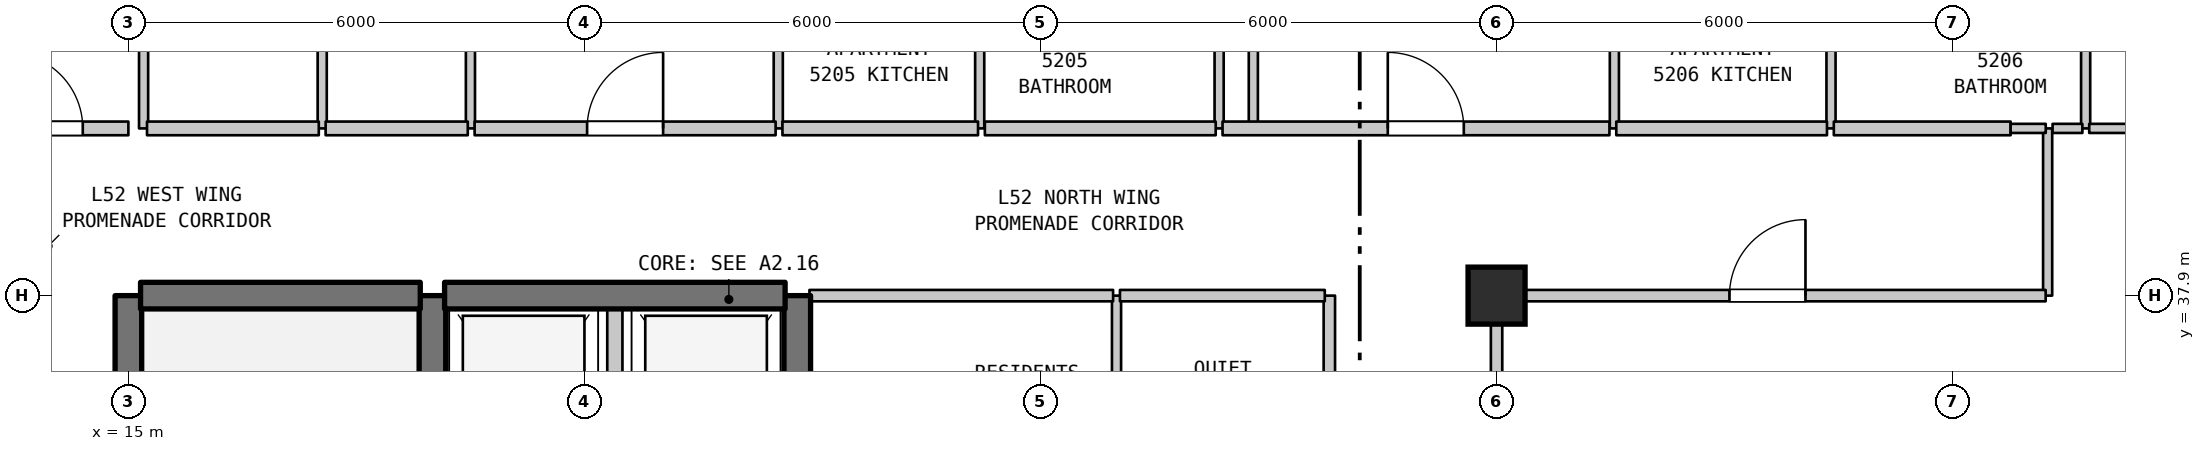
"""IFC4 building model, lengths in metres.
Left out: names, types, materials, properties, quantities, classifications, styles, units other than length and angle.
Written with IfcOpenShell. Run it as: python <this file> out.ifc"""

import sys

from ifc_helpers import new_model, si_unit, direction, frame, frame_2d, origin, origin_2d, place, context, subcontext, project, spatial, rectangle, extrude, element, fill, save


model = new_model("IFC4")
c1 = context("Model", 3, precision=1e-05, world=origin(), true_north=direction((0.0, 1.0)))
c2 = subcontext(c1, "Body", "Model", "MODEL_VIEW")
j1 = project(units=[si_unit("LENGTHUNIT", "METRE"), si_unit("PLANEANGLEUNIT", "RADIAN")], contexts=[c1])
p1 = place(None, origin())
s1 = spatial("IfcSite", under=j1, at=p1, CompositionType="ELEMENT")
p2 = place(p1, origin())
s2 = spatial("IfcBuilding", under=s1, at=p2, CompositionType="ELEMENT")
p3 = place(p2, frame((0.0, 0.0, 210.6)))
s3 = spatial("IfcBuildingStorey", under=s2, at=p3, CompositionType="ELEMENT", Elevation=210.6)
p4 = place(p3, frame((33.0, 37.9, 0.0), z_axis=(0.0, 0.0, 1.0), x_axis=(1.0, 0.0, 0.0)))
e1 = element("IfcColumn", 1, at=p4, inside=s3, PredefinedType="COLUMN", context=c2, shape_type="SweptSolid", body=[
    extrude(rectangle(XDim=0.75, YDim=0.75, at=origin_2d()), origin(), (0.0, 0.0, 1.0), 3.7),
])
p5 = place(p3, frame((15.0, 31.1, 0.0), z_axis=(0.0, 0.0, 1.0), x_axis=(0.0, 1.0, 0.0)))
e2 = element("IfcWall", 2, at=p5, inside=s3, PredefinedType="SHEAR", context=c2, shape_type="SweptSolid", body=[
    extrude(rectangle(XDim=6.8, YDim=0.35, at=frame_2d((3.4, 0.0))), origin(), (0.0, 0.0, 1.0), 3.39),
])
p6 = place(p3, frame((15.2, 40.1, 0.0), z_axis=(0.0, 0.0, 1.0), x_axis=(0.0, 1.0, 0.0)))
e3 = element("IfcWall", 3, at=p6, inside=s3, PredefinedType="PARTITIONING", context=c2, shape_type="SweptSolid", body=[
    extrude(rectangle(XDim=3.2, YDim=0.12, at=frame_2d((1.6, 0.0))), origin(), (0.0, 0.0, 1.0), 3.39),
])
p7 = place(p3, frame((17.55, 40.1, 0.0), z_axis=(0.0, 0.0, 1.0), x_axis=(0.0, 1.0, 0.0)))
e4 = element("IfcWall", 4, at=p7, inside=s3, PredefinedType="PARTITIONING", context=c2, shape_type="SweptSolid", body=[
    extrude(rectangle(XDim=3.2, YDim=0.12, at=frame_2d((1.6, 0.0))), origin(), (0.0, 0.0, 1.0), 3.39),
])
p8 = place(p7, frame((1.15, 0.0, 0.0)))
e5 = element("IfcOpeningElement", 5, at=p8, cuts=e4, PredefinedType="OPENING", context=c2, shape_type="SweptSolid", body=[
    extrude(rectangle(XDim=0.9, YDim=2.15, at=frame_2d((0.45, 1.075))), frame((0.0, 0.07, 0.0), z_axis=(0.0, -1.0, 0.0), x_axis=(1.0, 0.0, 0.0)), (0.0, 0.0, 1.0), 0.14),
])
p9 = place(p3, frame((19.0, 35.0, 0.0), z_axis=(0.0, 0.0, 1.0), x_axis=(0.0, 1.0, 0.0)))
e6 = element("IfcWall", 6, at=p9, inside=s3, PredefinedType="SHEAR", context=c2, shape_type="SweptSolid", body=[
    extrude(rectangle(XDim=2.9, YDim=0.35, at=frame_2d((1.45, 0.0))), origin(), (0.0, 0.0, 1.0), 3.39),
])
p10 = place(p3, frame((19.5, 40.1, 0.0), z_axis=(0.0, 0.0, 1.0), x_axis=(0.0, 1.0, 0.0)))
e7 = element("IfcWall", 7, at=p10, inside=s3, PredefinedType="PARTITIONING", context=c2, shape_type="SweptSolid", body=[
    extrude(rectangle(XDim=13.79, YDim=0.12, at=frame_2d((6.895, 0.0))), origin(), (0.0, 0.0, 1.0), 3.39),
])
p11 = place(p3, frame((21.4, 35.0, 0.0), z_axis=(0.0, 0.0, 1.0), x_axis=(0.0, 1.0, 0.0)))
e8 = element("IfcWall", 8, at=p11, inside=s3, PredefinedType="STANDARD", context=c2, shape_type="SweptSolid", body=[
    extrude(rectangle(XDim=2.9, YDim=0.2, at=frame_2d((1.45, 0.0))), origin(), (0.0, 0.0, 1.0), 3.39),
])
p12 = place(p3, frame((23.55, 40.1, 0.0), z_axis=(0.0, 0.0, 1.0), x_axis=(0.0, 1.0, 0.0)))
e9 = element("IfcWall", 9, at=p12, inside=s3, PredefinedType="PARTITIONING", context=c2, shape_type="SweptSolid", body=[
    extrude(rectangle(XDim=2.3, YDim=0.12, at=frame_2d((1.15, 0.0))), origin(), (0.0, 0.0, 1.0), 3.39),
])
p13 = place(p3, frame((23.8, 35.0, 0.0), z_axis=(0.0, 0.0, 1.0), x_axis=(0.0, 1.0, 0.0)))
e10 = element("IfcWall", 10, at=p13, inside=s3, PredefinedType="SHEAR", context=c2, shape_type="SweptSolid", body=[
    extrude(rectangle(XDim=2.9, YDim=0.35, at=frame_2d((1.45, 0.0))), origin(), (0.0, 0.0, 1.0), 3.39),
])
p14 = place(p3, frame((26.2, 40.1, 0.0), z_axis=(0.0, 0.0, 1.0), x_axis=(0.0, 1.0, 0.0)))
e11 = element("IfcWall", 11, at=p14, inside=s3, PredefinedType="PARTITIONING", context=c2, shape_type="SweptSolid", body=[
    extrude(rectangle(XDim=2.3, YDim=0.12, at=frame_2d((1.15, 0.0))), origin(), (0.0, 0.0, 1.0), 3.39),
])
p15 = place(p3, frame((28.0, 35.0, 0.0), z_axis=(0.0, 0.0, 1.0), x_axis=(0.0, 1.0, 0.0)))
e12 = element("IfcWall", 12, at=p15, inside=s3, PredefinedType="PARTITIONING", context=c2, shape_type="SweptSolid", body=[
    extrude(rectangle(XDim=2.9, YDim=0.12, at=frame_2d((1.45, 0.0))), origin(), (0.0, 0.0, 1.0), 3.39),
])
p16 = place(p3, frame((29.35, 40.1, 0.0), z_axis=(0.0, 0.0, 1.0), x_axis=(0.0, 1.0, 0.0)))
e13 = element("IfcWall", 13, at=p16, inside=s3, PredefinedType="PARTITIONING", context=c2, shape_type="SweptSolid", body=[
    extrude(rectangle(XDim=2.3, YDim=0.12, at=frame_2d((1.15, 0.0))), origin(), (0.0, 0.0, 1.0), 3.39),
])
p17 = place(p3, frame((29.8, 40.1, 0.0), z_axis=(0.0, 0.0, 1.0), x_axis=(0.0, 1.0, 0.0)))
e14 = element("IfcWall", 14, at=p17, inside=s3, PredefinedType="PARTITIONING", context=c2, shape_type="SweptSolid", body=[
    extrude(rectangle(XDim=13.79, YDim=0.12, at=frame_2d((6.895, 0.0))), origin(), (0.0, 0.0, 1.0), 3.39),
])
p18 = place(p3, frame((30.8, 35.0, 0.0), z_axis=(0.0, 0.0, 1.0), x_axis=(0.0, 1.0, 0.0)))
e15 = element("IfcWall", 15, at=p18, inside=s3, PredefinedType="STANDARD", context=c2, shape_type="SweptSolid", body=[
    extrude(rectangle(XDim=2.9, YDim=0.15, at=frame_2d((1.45, 0.0))), origin(), (0.0, 0.0, 1.0), 3.39),
])
p19 = place(p3, frame((33.0, 29.16, 0.0), z_axis=(0.0, 0.0, 1.0), x_axis=(0.0, 1.0, 0.0)))
e16 = element("IfcWall", 16, at=p19, inside=s3, PredefinedType="STANDARD", context=c2, shape_type="SweptSolid", body=[
    extrude(rectangle(XDim=8.74, YDim=0.15, at=frame_2d((4.37, 0.0))), origin(), (0.0, 0.0, 1.0), 2.89),
])
p20 = place(p19, frame((3.799, 0.0, 0.0)))
e17 = element("IfcOpeningElement", 17, at=p20, cuts=e16, PredefinedType="OPENING", context=c2, shape_type="SweptSolid", body=[
    extrude(rectangle(XDim=1.0, YDim=2.15, at=frame_2d((0.5, 1.075))), frame((0.0, 0.085, 0.0), z_axis=(0.0, -1.0, 0.0), x_axis=(1.0, 0.0, 0.0)), (0.0, 0.0, 1.0), 0.17),
])
for number, where, z_axis, x_axis in (
    (18, (34.55, 40.1, 0.0), (0.0, 0.0, 1.0), (0.0, 1.0, 0.0)),
    (19, (37.4, 40.1, 0.0), (0.0, 0.0, 1.0), (0.0, 1.0, 0.0)),
):
    element("IfcWall", number, at=place(p3, frame(where, z_axis=z_axis, x_axis=x_axis)), inside=s3, PredefinedType="PARTITIONING", context=c2, shape_type="SweptSolid", body=[
        extrude(rectangle(XDim=2.3, YDim=0.12, at=frame_2d((1.15, 0.0))), origin(), (0.0, 0.0, 1.0), 3.39),
    ])
p21 = place(p3, frame((40.25, 37.9, 0.0), z_axis=(0.0, 0.0, 1.0), x_axis=(0.0, 1.0, 0.0)))
e20 = element("IfcWall", 20, at=p21, inside=s3, PredefinedType="PARTITIONING", context=c2, shape_type="SweptSolid", body=[
    extrude(rectangle(XDim=2.2, YDim=0.12, at=frame_2d((1.1, 0.0))), origin(), (0.0, 0.0, 1.0), 3.39),
])
p22 = place(p3, frame((40.75, 40.1, 0.0), z_axis=(0.0, 0.0, 1.0), x_axis=(0.0, 1.0, 0.0)))
e21 = element("IfcWall", 21, at=p22, inside=s3, PredefinedType="PARTITIONING", context=c2, shape_type="SweptSolid", body=[
    extrude(rectangle(XDim=2.3, YDim=0.12, at=frame_2d((1.15, 0.0))), origin(), (0.0, 0.0, 1.0), 3.39),
])
p23 = place(p3, frame((15.16, 37.9, 0.0), z_axis=(0.0, 0.0, 1.0), x_axis=(1.0, 0.0, 0.0)))
e22 = element("IfcWall", 22, at=p23, inside=s3, PredefinedType="SHEAR", context=c2, shape_type="SweptSolid", body=[
    extrude(rectangle(XDim=3.68, YDim=0.35, at=frame_2d((1.84, 0.0))), origin(), (0.0, 0.0, 1.0), 3.39),
])
p24 = place(p3, frame((19.16, 37.9, 0.0), z_axis=(0.0, 0.0, 1.0), x_axis=(1.0, 0.0, 0.0)))
e23 = element("IfcWall", 23, at=p24, inside=s3, PredefinedType="SHEAR", context=c2, shape_type="SweptSolid", body=[
    extrude(rectangle(XDim=4.48, YDim=0.35, at=frame_2d((2.24, 0.0))), origin(), (0.0, 0.0, 1.0), 3.39),
])
p25 = place(p3, frame((23.96, 37.9, 0.0), z_axis=(0.0, 0.0, 1.0), x_axis=(1.0, 0.0, 0.0)))
e24 = element("IfcWall", 24, at=p25, inside=s3, PredefinedType="STANDARD", context=c2, shape_type="SweptSolid", body=[
    extrude(rectangle(XDim=3.995, YDim=0.15, at=frame_2d((1.998, 0.0))), origin(), (0.0, 0.0, 1.0), 2.89),
])
p26 = place(p3, frame((28.045, 37.9, 0.0), z_axis=(0.0, 0.0, 1.0), x_axis=(1.0, 0.0, 0.0)))
e25 = element("IfcWall", 25, at=p26, inside=s3, PredefinedType="STANDARD", context=c2, shape_type="SweptSolid", body=[
    extrude(rectangle(XDim=2.695, YDim=0.15, at=frame_2d((1.348, 0.0))), origin(), (0.0, 0.0, 1.0), 2.89),
])
p27 = place(p3, frame((33.06, 37.9, 0.0), z_axis=(0.0, 0.0, 1.0), x_axis=(1.0, 0.0, 0.0)))
e26 = element("IfcWall", 26, at=p27, inside=s3, PredefinedType="STANDARD", context=c2, shape_type="SweptSolid", body=[
    extrude(rectangle(XDim=7.164, YDim=0.15, at=frame_2d((3.582, 0.0))), origin(), (0.0, 0.0, 1.0), 3.39),
])
p28 = place(p27, frame((3.004, 0.0, 0.0)))
e27 = element("IfcOpeningElement", 27, at=p28, cuts=e26, PredefinedType="OPENING", context=c2, shape_type="SweptSolid", body=[
    extrude(rectangle(XDim=1.0, YDim=2.15, at=frame_2d((0.5, 1.075))), frame((0.0, 0.085, 0.0), z_axis=(0.0, -1.0, 0.0), x_axis=(1.0, 0.0, 0.0)), (0.0, 0.0, 1.0), 0.17),
])
p29 = place(p3, frame((12.875, 40.1, 0.0), z_axis=(0.0, 0.0, 1.0), x_axis=(1.0, 0.0, 0.0)))
e28 = element("IfcWall", 28, at=p29, inside=s3, PredefinedType="STANDARD", context=c2, shape_type="SweptSolid", body=[
    extrude(rectangle(XDim=2.125, YDim=0.18, at=frame_2d((1.062, 0.0))), origin(), (0.0, 0.0, 1.0), 3.39),
])
p30 = place(p29, frame((0.525, 0.0, 0.0)))
e29 = element("IfcOpeningElement", 29, at=p30, cuts=e28, PredefinedType="OPENING", context=c2, shape_type="SweptSolid", body=[
    extrude(rectangle(XDim=1.0, YDim=2.15, at=frame_2d((0.5, 1.075))), frame((0.0, 0.1, 0.0), z_axis=(0.0, -1.0, 0.0), x_axis=(1.0, 0.0, 0.0)), (0.0, 0.0, 1.0), 0.2),
])
p31 = place(p3, frame((15.245, 40.1, 0.0), z_axis=(0.0, 0.0, 1.0), x_axis=(1.0, 0.0, 0.0)))
e30 = element("IfcWall", 30, at=p31, inside=s3, PredefinedType="STANDARD", context=c2, shape_type="SweptSolid", body=[
    extrude(rectangle(XDim=2.26, YDim=0.18, at=frame_2d((1.13, 0.0))), origin(), (0.0, 0.0, 1.0), 3.39),
])
p32 = place(p3, frame((17.595, 40.1, 0.0), z_axis=(0.0, 0.0, 1.0), x_axis=(1.0, 0.0, 0.0)))
e31 = element("IfcWall", 31, at=p32, inside=s3, PredefinedType="STANDARD", context=c2, shape_type="SweptSolid", body=[
    extrude(rectangle(XDim=1.87, YDim=0.18, at=frame_2d((0.935, 0.0))), origin(), (0.0, 0.0, 1.0), 3.39),
])
p33 = place(p3, frame((19.555, 40.1, 0.0), z_axis=(0.0, 0.0, 1.0), x_axis=(1.0, 0.0, 0.0)))
e32 = element("IfcWall", 32, at=p33, inside=s3, PredefinedType="STANDARD", context=c2, shape_type="SweptSolid", body=[
    extrude(rectangle(XDim=3.96, YDim=0.18, at=frame_2d((1.98, 0.0))), origin(), (0.0, 0.0, 1.0), 3.39),
])
p34 = place(p33, frame((1.48, 0.0, 0.0)))
e33 = element("IfcOpeningElement", 33, at=p34, cuts=e32, PredefinedType="OPENING", context=c2, shape_type="SweptSolid", body=[
    extrude(rectangle(XDim=1.0, YDim=2.15, at=frame_2d((0.5, 1.075))), frame((0.0, 0.1, 0.0), z_axis=(0.0, -1.0, 0.0), x_axis=(1.0, 0.0, 0.0)), (0.0, 0.0, 1.0), 0.2),
])
p35 = place(p3, frame((23.605, 40.1, 0.0), z_axis=(0.0, 0.0, 1.0), x_axis=(1.0, 0.0, 0.0)))
e34 = element("IfcWall", 34, at=p35, inside=s3, PredefinedType="STANDARD", context=c2, shape_type="SweptSolid", body=[
    extrude(rectangle(XDim=2.573, YDim=0.18, at=frame_2d((1.287, 0.0))), origin(), (0.0, 0.0, 1.0), 3.39),
])
p36 = place(p3, frame((26.268, 40.1, 0.0), z_axis=(0.0, 0.0, 1.0), x_axis=(1.0, 0.0, 0.0)))
e35 = element("IfcWall", 35, at=p36, inside=s3, PredefinedType="STANDARD", context=c2, shape_type="SweptSolid", body=[
    extrude(rectangle(XDim=3.037, YDim=0.18, at=frame_2d((1.519, 0.0))), origin(), (0.0, 0.0, 1.0), 3.39),
])
p37 = place(p3, frame((29.395, 40.1, 0.0), z_axis=(0.0, 0.0, 1.0), x_axis=(1.0, 0.0, 0.0)))
e36 = element("IfcWall", 36, at=p37, inside=s3, PredefinedType="STANDARD", context=c2, shape_type="SweptSolid", body=[
    extrude(rectangle(XDim=5.09, YDim=0.18, at=frame_2d((2.545, 0.0))), origin(), (0.0, 0.0, 1.0), 3.39),
])
p38 = place(p37, frame((2.174, 0.0, 0.0)))
e37 = element("IfcOpeningElement", 37, at=p38, cuts=e36, PredefinedType="OPENING", context=c2, shape_type="SweptSolid", body=[
    extrude(rectangle(XDim=1.0, YDim=2.15, at=frame_2d((0.5, 1.075))), frame((0.0, 0.1, 0.0), z_axis=(0.0, -1.0, 0.0), x_axis=(1.0, 0.0, 0.0)), (0.0, 0.0, 1.0), 0.2),
])
p39 = place(p3, frame((34.575, 40.1, 0.0), z_axis=(0.0, 0.0, 1.0), x_axis=(1.0, 0.0, 0.0)))
e38 = element("IfcWall", 38, at=p39, inside=s3, PredefinedType="STANDARD", context=c2, shape_type="SweptSolid", body=[
    extrude(rectangle(XDim=2.772, YDim=0.18, at=frame_2d((1.386, 0.0))), origin(), (0.0, 0.0, 1.0), 3.39),
])
p40 = place(p3, frame((37.437, 40.1, 0.0), z_axis=(0.0, 0.0, 1.0), x_axis=(1.0, 0.0, 0.0)))
e39 = element("IfcWall", 39, at=p40, inside=s3, PredefinedType="STANDARD", context=c2, shape_type="SweptSolid", body=[
    extrude(rectangle(XDim=2.326, YDim=0.18, at=frame_2d((1.163, 0.0))), origin(), (0.0, 0.0, 1.0), 3.39),
])
p41 = place(p3, frame((39.763, 40.1, 0.0), z_axis=(0.0, 0.0, 1.0), x_axis=(1.0, 0.0, 0.0)))
e40 = element("IfcWall", 40, at=p41, inside=s3, PredefinedType="PARTITIONING", context=c2, shape_type="SweptSolid", body=[
    extrude(rectangle(XDim=0.462, YDim=0.12, at=frame_2d((0.231, 0.0))), origin(), (0.0, 0.0, 1.0), 3.39),
])
p42 = place(p3, frame((40.315, 40.1, 0.0), z_axis=(0.0, 0.0, 1.0), x_axis=(1.0, 0.0, 0.0)))
e41 = element("IfcWall", 41, at=p42, inside=s3, PredefinedType="PARTITIONING", context=c2, shape_type="SweptSolid", body=[
    extrude(rectangle(XDim=0.392, YDim=0.12, at=frame_2d((0.196, 0.0))), origin(), (0.0, 0.0, 1.0), 3.39),
])
p43 = place(p3, frame((40.797, 40.1, 0.0), z_axis=(0.0, 0.0, 1.0), x_axis=(1.0, 0.0, 0.0)))
e42 = element("IfcWall", 42, at=p43, inside=s3, PredefinedType="PARTITIONING", context=c2, shape_type="SweptSolid", body=[
    extrude(rectangle(XDim=1.378, YDim=0.12, at=frame_2d((0.689, 0.0))), origin(), (0.0, 0.0, 1.0), 3.39),
])
p44 = place(p28, origin())
e43 = element("IfcDoor", 43, at=p44, inside=s3, OperationType="SINGLE_SWING_RIGHT", PredefinedType="DOOR", context=c2, shape_type="SweptSolid", body=[
    extrude(rectangle(XDim=1.0, YDim=2.15, at=frame_2d((0.5, 1.075))), frame((0.0, 0.025, 0.0), z_axis=(0.0, -1.0, 0.0), x_axis=(1.0, 0.0, 0.0)), (0.0, 0.0, 1.0), 0.05),
])
fill(e27, e43)
p45 = place(p30, origin())
e44 = element("IfcDoor", 44, at=p45, inside=s3, OperationType="SINGLE_SWING_LEFT", PredefinedType="DOOR", context=c2, shape_type="SweptSolid", body=[
    extrude(rectangle(XDim=1.0, YDim=2.15, at=frame_2d((0.5, 1.075))), frame((0.0, 0.025, 0.0), z_axis=(0.0, -1.0, 0.0), x_axis=(1.0, 0.0, 0.0)), (0.0, 0.0, 1.0), 0.05),
])
fill(e29, e44)
p46 = place(p34, origin())
e45 = element("IfcDoor", 45, at=p46, inside=s3, OperationType="SINGLE_SWING_RIGHT", PredefinedType="DOOR", context=c2, shape_type="SweptSolid", body=[
    extrude(rectangle(XDim=1.0, YDim=2.15, at=frame_2d((0.5, 1.075))), frame((0.0, 0.025, 0.0), z_axis=(0.0, -1.0, 0.0), x_axis=(1.0, 0.0, 0.0)), (0.0, 0.0, 1.0), 0.05),
])
fill(e33, e45)
p47 = place(p38, origin())
e46 = element("IfcDoor", 46, at=p47, inside=s3, OperationType="SINGLE_SWING_LEFT", PredefinedType="DOOR", context=c2, shape_type="SweptSolid", body=[
    extrude(rectangle(XDim=1.0, YDim=2.15, at=frame_2d((0.5, 1.075))), frame((0.0, 0.025, 0.0), z_axis=(0.0, -1.0, 0.0), x_axis=(1.0, 0.0, 0.0)), (0.0, 0.0, 1.0), 0.05),
])
fill(e37, e46)
save(model, sys.argv[1])
